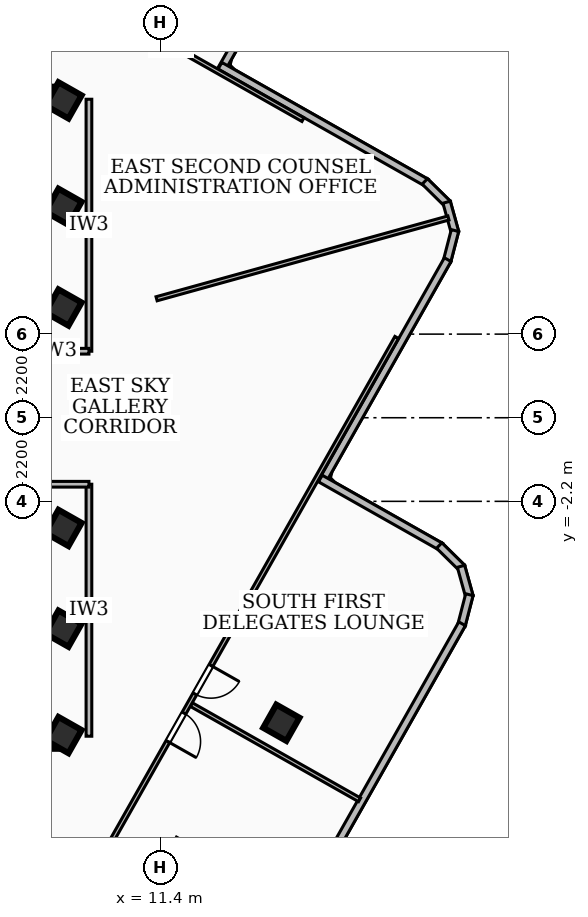
"""IFC4 building model, lengths in metres.
Left out: names, types, materials, properties, quantities, classifications, styles, units other than length and angle.
Written with IfcOpenShell. Run it as: python <this file> out.ifc"""

import sys

from ifc_helpers import new_model, si_unit, direction, frame, frame_2d, origin, origin_2d, place, context, subcontext, project, spatial, rectangle, extrude, element, fill, save


model = new_model("IFC4")
c1 = context("Model", 3, precision=1e-05, world=origin(), true_north=direction((0.0, 1.0)))
c2 = subcontext(c1, "Body", "Model", "MODEL_VIEW")
j1 = project(units=[si_unit("LENGTHUNIT", "METRE"), si_unit("PLANEANGLEUNIT", "RADIAN")], contexts=[c1])
p1 = place(None, origin())
s1 = spatial("IfcSite", under=j1, at=p1, CompositionType="ELEMENT")
p2 = place(p1, origin())
s2 = spatial("IfcBuilding", under=s1, at=p2, CompositionType="ELEMENT")
p3 = place(p2, frame((0.0, 0.0, 281.7)))
s3 = spatial("IfcBuildingStorey", under=s2, at=p3, CompositionType="ELEMENT", Elevation=281.7)
for number, where, z_axis, x_axis in (
    (1, (-8.78, 8.51, 0.0), (0.0, 0.0, 1.0), (1.0, 0.0, 0.0)),
    (2, (8.78, -8.51, 0.0), (0.0, 0.0, 1.0), (-1.0, 0.0, 0.0)),
):
    element("IfcWall", number, at=place(p3, frame(where, z_axis=z_axis, x_axis=x_axis)), inside=s3, PredefinedType="SHEAR", context=c2, shape_type="SweptSolid", body=[
        extrude(rectangle(XDim=17.56, YDim=0.4, at=frame_2d((8.78, 0.0))), origin(), (0.0, 0.0, 1.0), 3.12),
    ])
for number, where, z_axis, x_axis in (
    (3, (8.85, -5.55, 0.0), (0.0, 0.0, 1.0), (0.493, 0.87, 0.0)),
    (4, (8.85, -2.9, 0.0), (0.0, 0.0, 1.0), (0.493, 0.87, 0.0)),
    (5, (8.85, 2.9, 0.0), (0.0, 0.0, 1.0), (0.493, 0.87, 0.0)),
    (6, (8.85, 5.55, 0.0), (0.0, 0.0, 1.0), (0.493, 0.87, 0.0)),
    (7, (8.85, -8.35, 0.0), (0.0, 0.0, 1.0), (0.493, 0.87, 0.0)),
    (8, (8.85, 8.35, 0.0), (0.0, 0.0, 1.0), (0.493, 0.87, 0.0)),
    (9, (14.583, -8.026, 0.0), (0.0, 0.0, 1.0), (0.493, 0.87, 0.0)),
):
    element("IfcColumn", number, at=place(p3, frame(where, z_axis=z_axis, x_axis=x_axis)), inside=s3, PredefinedType="COLUMN", context=c2, shape_type="SweptSolid", body=[
        extrude(rectangle(XDim=0.7, YDim=0.7, at=origin_2d()), origin(), (0.0, 0.0, 1.0), 3.42),
    ])
p4 = place(p3, frame((17.058, 16.326, 0.0), z_axis=(0.0, 0.0, 1.0), x_axis=(-0.492504245901, -0.870310041175, 0.0)))
e10 = element("IfcWall", 10, at=p4, inside=s3, PredefinedType="SOLIDWALL", context=c2, shape_type="SweptSolid", body=[
    extrude(rectangle(XDim=8.242, YDim=0.2, at=frame_2d((4.121, 0.0))), origin(), (0.0, 0.0, 1.0), 3.12),
])
p5 = place(p4, frame((0.85, 0.0, 0.85)))
e11 = element("IfcOpeningElement", 11, at=p5, cuts=e10, PredefinedType="OPENING", context=c2, shape_type="SweptSolid", body=[
    extrude(rectangle(XDim=2.1, YDim=2.0, at=frame_2d((1.05, 1.0))), frame((0.0, 0.11, 0.0), z_axis=(0.0, -1.0, 0.0), x_axis=(1.0, 0.0, 0.0)), (0.0, 0.0, 1.0), 0.22),
])
p6 = place(p3, frame((12.968, 9.262, 0.0), z_axis=(0.0, 0.0, 1.0), x_axis=(0.87026539867, -0.492583125855, 0.0)))
e12 = element("IfcWall", 12, at=p6, inside=s3, PredefinedType="SOLIDWALL", context=c2, shape_type="SweptSolid", body=[
    extrude(rectangle(XDim=6.24, YDim=0.2, at=frame_2d((3.12, 0.0))), origin(), (0.0, 0.0, 1.0), 3.12),
])
p7 = place(p3, frame((18.359, 6.218, 0.0), z_axis=(0.0, 0.0, 1.0), x_axis=(0.712466161804, -0.701706468749, 0.0)))
e13 = element("IfcWall", 13, at=p7, inside=s3, PredefinedType="SOLIDWALL", context=c2, shape_type="SweptSolid", body=[
    extrude(rectangle(XDim=0.84, YDim=0.2, at=frame_2d((0.42, 0.0))), origin(), (0.0, 0.0, 1.0), 3.12),
])
p8 = place(p3, frame((18.932, 5.671, 0.0), z_axis=(0.0, 0.0, 1.0), x_axis=(0.268377126675, -0.963313924885, 0.0)))
e14 = element("IfcWall", 14, at=p8, inside=s3, PredefinedType="SOLIDWALL", context=c2, shape_type="SweptSolid", body=[
    extrude(rectangle(XDim=0.824, YDim=0.2, at=frame_2d((0.412, 0.0))), origin(), (0.0, 0.0, 1.0), 3.12),
])
p9 = place(p3, frame((19.152, 4.925, 0.0), z_axis=(0.0, 0.0, 1.0), x_axis=(-0.250891369276, -0.968015248239, 0.0)))
e15 = element("IfcWall", 15, at=p9, inside=s3, PredefinedType="SOLIDWALL", context=c2, shape_type="SweptSolid", body=[
    extrude(rectangle(XDim=0.838, YDim=0.2, at=frame_2d((0.419, 0.0))), origin(), (0.0, 0.0, 1.0), 3.12),
])
p10 = place(p3, frame((18.96, 4.16, 0.0), z_axis=(0.0, 0.0, 1.0), x_axis=(-0.492441425139, -0.870345588147, 0.0)))
e16 = element("IfcWall", 16, at=p10, inside=s3, PredefinedType="SOLIDWALL", context=c2, shape_type="SweptSolid", body=[
    extrude(rectangle(XDim=6.742, YDim=0.2, at=frame_2d((3.371, 0.0))), origin(), (0.0, 0.0, 1.0), 3.12),
])
p11 = place(p3, frame((15.609, -1.599, 0.0), z_axis=(0.0, 0.0, 1.0), x_axis=(0.87036421417, -0.49240850388, 0.0)))
e17 = element("IfcWall", 17, at=p11, inside=s3, PredefinedType="SOLIDWALL", context=c2, shape_type="SweptSolid", body=[
    extrude(rectangle(XDim=3.641, YDim=0.2, at=frame_2d((1.821, 0.0))), origin(), (0.0, 0.0, 1.0), 3.12),
])
p12 = place(p3, frame((18.738, -3.362, 0.0), z_axis=(0.0, 0.0, 1.0), x_axis=(0.712468358306, -0.70170423856, 0.0)))
e18 = element("IfcWall", 18, at=p12, inside=s3, PredefinedType="SOLIDWALL", context=c2, shape_type="SweptSolid", body=[
    extrude(rectangle(XDim=0.839, YDim=0.2, at=frame_2d((0.419, 0.0))), origin(), (0.0, 0.0, 1.0), 3.12),
])
p13 = place(p3, frame((19.311, -3.909, 0.0), z_axis=(0.0, 0.0, 1.0), x_axis=(0.267720149776, -0.963496715824, 0.0)))
e19 = element("IfcWall", 19, at=p13, inside=s3, PredefinedType="SOLIDWALL", context=c2, shape_type="SweptSolid", body=[
    extrude(rectangle(XDim=0.825, YDim=0.2, at=frame_2d((0.413, 0.0))), origin(), (0.0, 0.0, 1.0), 3.12),
])
p14 = place(p3, frame((19.531, -4.656, 0.0), z_axis=(0.0, 0.0, 1.0), x_axis=(-0.250618286331, -0.968085985105, 0.0)))
e20 = element("IfcWall", 20, at=p14, inside=s3, PredefinedType="SOLIDWALL", context=c2, shape_type="SweptSolid", body=[
    extrude(rectangle(XDim=0.838, YDim=0.2, at=frame_2d((0.419, 0.0))), origin(), (0.0, 0.0, 1.0), 3.12),
])
p15 = place(p3, frame((19.339, -5.421, 0.0), z_axis=(0.0, 0.0, 1.0), x_axis=(-0.492615794655, -0.870246906835, 0.0)))
e21 = element("IfcWall", 21, at=p15, inside=s3, PredefinedType="SOLIDWALL", context=c2, shape_type="SweptSolid", body=[
    extrude(rectangle(XDim=10.124, YDim=0.2, at=frame_2d((5.062, 0.0))), origin(), (0.0, 0.0, 1.0), 3.12),
])
p16 = place(p15, frame((6.846, 0.0, 0.85)))
e22 = element("IfcOpeningElement", 22, at=p16, cuts=e21, PredefinedType="OPENING", context=c2, shape_type="SweptSolid", body=[
    extrude(rectangle(XDim=2.1, YDim=2.0, at=frame_2d((1.05, 1.0))), frame((0.0, 0.11, 0.0), z_axis=(0.0, -1.0, 0.0), x_axis=(1.0, 0.0, 0.0)), (0.0, 0.0, 1.0), 0.22),
])
p17 = place(p3, frame((9.52, 1.75, 0.0), z_axis=(0.0, 0.0, 1.0), x_axis=(0.0, 1.0, 0.0)))
e23 = element("IfcWall", 23, at=p17, inside=s3, PredefinedType="PARTITIONING", context=c2, shape_type="SweptSolid", body=[
    extrude(rectangle(XDim=6.63, YDim=0.15, at=frame_2d((3.315, 0.0))), origin(), (0.0, 0.0, 1.0), 3.12),
])
p18 = place(p3, frame((7.85, 1.75, 0.0), z_axis=(0.0, 0.0, 1.0), x_axis=(1.0, 0.0, 0.0)))
e24 = element("IfcWall", 24, at=p18, inside=s3, PredefinedType="PARTITIONING", context=c2, shape_type="SweptSolid", body=[
    extrude(rectangle(XDim=1.67, YDim=0.15, at=frame_2d((0.835, 0.0))), origin(), (0.0, 0.0, 1.0), 2.35),
])
p19 = place(p3, frame((9.52, -8.38, 0.0), z_axis=(0.0, 0.0, 1.0), x_axis=(0.0, 1.0, 0.0)))
e25 = element("IfcWall", 25, at=p19, inside=s3, PredefinedType="PARTITIONING", context=c2, shape_type="SweptSolid", body=[
    extrude(rectangle(XDim=6.63, YDim=0.15, at=frame_2d((3.315, 0.0))), origin(), (0.0, 0.0, 1.0), 2.49),
])
p20 = place(p3, frame((7.85, -1.75, 0.0), z_axis=(0.0, 0.0, 1.0), x_axis=(1.0, 0.0, 0.0)))
e26 = element("IfcWall", 26, at=p20, inside=s3, PredefinedType="PARTITIONING", context=c2, shape_type="SweptSolid", body=[
    extrude(rectangle(XDim=1.67, YDim=0.15, at=frame_2d((0.835, 0.0))), origin(), (0.0, 0.0, 1.0), 2.35),
])
p21 = place(p3, frame((11.3, 3.13, 0.0), z_axis=(0.0, 0.0, 1.0), x_axis=(0.963747113025, 0.26681735726, 0.0)))
e27 = element("IfcWall", 27, at=p21, inside=s3, PredefinedType="PARTITIONING", context=c2, shape_type="SweptSolid", body=[
    extrude(rectangle(XDim=7.969, YDim=0.11, at=frame_2d((3.984, 0.0))), origin(), (0.0, 0.0, 1.0), 3.12),
])
p22 = place(p3, frame((15.152, 7.843, 0.0), z_axis=(0.0, 0.0, 1.0), x_axis=(-0.87023152106, 0.492642973921, 0.0)))
e28 = element("IfcWall", 28, at=p22, inside=s3, PredefinedType="PARTITIONING", context=c2, shape_type="SweptSolid", body=[
    extrude(rectangle(XDim=7.951, YDim=0.11, at=frame_2d((3.976, 0.0))), origin(), (0.0, 0.0, 1.0), 2.49),
])
p23 = place(p3, frame((12.216, -7.549, 0.0), z_axis=(0.0, 0.0, 1.0), x_axis=(0.870245204201, -0.492618802488, 0.0)))
e29 = element("IfcWall", 29, at=p23, inside=s3, PredefinedType="PARTITIONING", context=c2, shape_type="SweptSolid", body=[
    extrude(rectangle(XDim=5.085, YDim=0.11, at=frame_2d((2.542, 0.0))), origin(), (0.0, 0.0, 1.0), 2.49),
])
p24 = place(p3, frame((17.619, 2.113, 0.0), z_axis=(0.0, 0.0, 1.0), x_axis=(-0.492746831558, -0.870172718482, 0.0)))
e30 = element("IfcWall", 30, at=p24, inside=s3, PredefinedType="PARTITIONING", context=c2, shape_type="SweptSolid", body=[
    extrude(rectangle(XDim=20.54, YDim=0.11, at=frame_2d((10.27, 0.0))), origin(), (0.0, 0.0, 1.0), 2.49),
])
p25 = place(p24, frame((11.36, 0.0, 0.0)))
e31 = element("IfcOpeningElement", 31, at=p25, cuts=e30, PredefinedType="OPENING", context=c2, shape_type="SweptSolid", body=[
    extrude(rectangle(XDim=0.86, YDim=2.04, at=frame_2d((0.43, 1.02))), frame((0.0, 0.065, 0.0), z_axis=(0.0, -1.0, 0.0), x_axis=(1.0, 0.0, 0.0)), (0.0, 0.0, 1.0), 0.13),
])
p26 = place(p24, frame((9.92, 0.0, 0.0)))
e32 = element("IfcOpeningElement", 32, at=p26, cuts=e30, PredefinedType="OPENING", context=c2, shape_type="SweptSolid", body=[
    extrude(rectangle(XDim=0.86, YDim=2.04, at=frame_2d((0.43, 1.02))), frame((0.0, 0.065, 0.0), z_axis=(0.0, -1.0, 0.0), x_axis=(1.0, 0.0, 0.0)), (0.0, 0.0, 1.0), 0.13),
])
p27 = place(p25, origin())
e33 = element("IfcDoor", 33, at=p27, inside=s3, OperationType="SINGLE_SWING_RIGHT", PredefinedType="DOOR", context=c2, shape_type="SweptSolid", body=[
    extrude(rectangle(XDim=0.86, YDim=2.04, at=frame_2d((0.43, 1.02))), frame((0.0, 0.025, 0.0), z_axis=(0.0, -1.0, 0.0), x_axis=(1.0, 0.0, 0.0)), (0.0, 0.0, 1.0), 0.05),
])
fill(e31, e33)
p28 = place(p26, origin())
e34 = element("IfcDoor", 34, at=p28, inside=s3, OperationType="SINGLE_SWING_LEFT", PredefinedType="DOOR", context=c2, shape_type="SweptSolid", body=[
    extrude(rectangle(XDim=0.86, YDim=2.04, at=frame_2d((0.43, 1.02))), frame((0.0, 0.025, 0.0), z_axis=(0.0, -1.0, 0.0), x_axis=(1.0, 0.0, 0.0)), (0.0, 0.0, 1.0), 0.05),
])
fill(e32, e34)
save(model, sys.argv[1])
